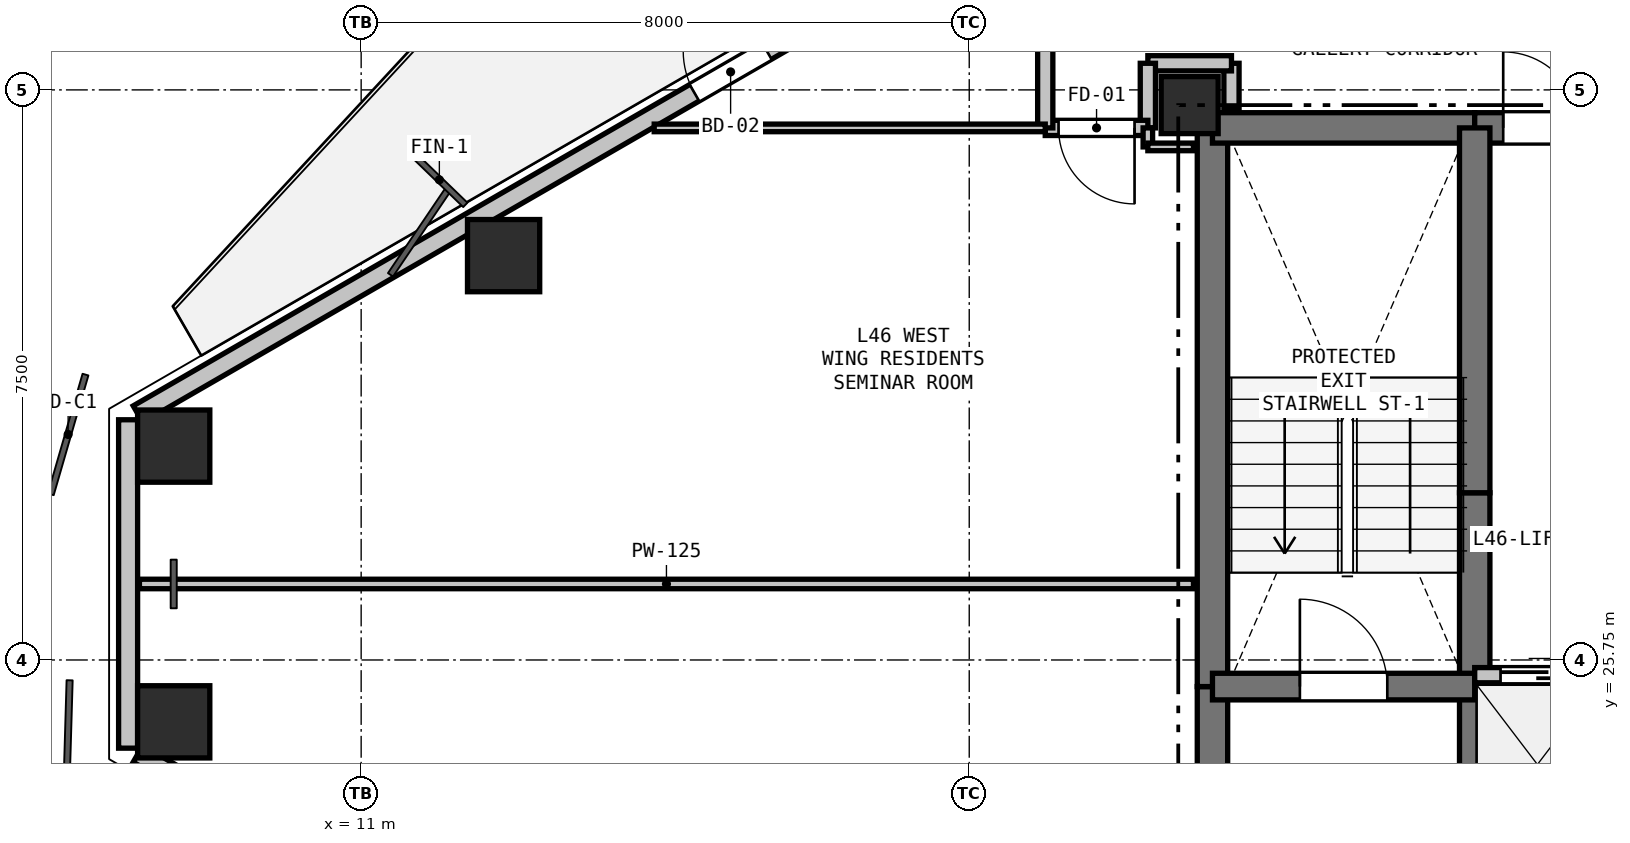
"""IFC4 building model, lengths in metres.
Left out: names, types, materials, properties, quantities, classifications, styles, units other than length and angle.
Written with IfcOpenShell. Run it as: python <this file> out.ifc"""

import sys

from ifc_helpers import new_model, si_unit, direction, frame, frame_2d, origin, origin_2d, place, context, subcontext, project, spatial, rectangle, hollow_rectangle, extrude, element, fill, save


model = new_model("IFC4")
c1 = context("Model", 3, precision=1e-05, world=origin(), true_north=direction((0.0, 1.0)))
c2 = subcontext(c1, "Body", "Model", "MODEL_VIEW")
j1 = project(units=[si_unit("LENGTHUNIT", "METRE"), si_unit("PLANEANGLEUNIT", "RADIAN")], contexts=[c1])
p1 = place(None, origin())
s1 = spatial("IfcSite", under=j1, at=p1, CompositionType="ELEMENT")
p2 = place(p1, origin())
s2 = spatial("IfcBuilding", under=s1, at=p2, CompositionType="ELEMENT")
p3 = place(p2, frame((0.0, 0.0, 167.4)))
s3 = spatial("IfcBuildingStorey", under=s2, at=p3, CompositionType="ELEMENT", Elevation=167.4)
p4 = place(p3, frame((21.9, 33.05, 0.0), z_axis=(0.0, 0.0, 1.0), x_axis=(1.0, 0.0, 0.0)))
e1 = element("IfcColumn", 1, at=p4, inside=s3, PredefinedType="COLUMN", context=c2, shape_type="SweptSolid", body=[
    extrude(rectangle(XDim=0.75, YDim=0.75, at=origin_2d()), origin(), (0.0, 0.0, 1.0), 3.3),
])
for number, where, z_axis, x_axis in (
    (2, (8.534, 28.564, -0.23), (0.0, 0.0, 1.0), (1.0, 0.0, 0.0)),
    (3, (12.874, 31.07, -0.23), (0.0, 0.0, 1.0), (1.0, 0.0, 0.0)),
    (4, (8.534, 24.936, -0.23), (0.0, 0.0, 1.0), (1.0, 0.0, 0.0)),
):
    element("IfcColumn", number, at=place(p3, frame(where, z_axis=z_axis, x_axis=x_axis)), inside=s3, PredefinedType="COLUMN", context=c2, shape_type="SweptSolid", body=[
        extrude(hollow_rectangle(XDim=0.95, YDim=0.95, WallThickness=0.028, at=origin_2d()), origin(), (0.0, 0.0, 1.0), 3.53),
    ])
p5 = place(p3, frame((7.934, 24.59, 0.0), z_axis=(0.0, 0.0, 1.0), x_axis=(0.0, 1.0, 0.0)))
e5 = element("IfcWall", 5, at=p5, inside=s3, PredefinedType="SOLIDWALL", context=c2, shape_type="SweptSolid", body=[
    extrude(rectangle(XDim=4.32, YDim=0.25, at=frame_2d((2.16, 0.0))), origin(), (0.0, 0.0, 1.0), 2.64),
])
p6 = place(p3, frame((8.064, 28.985, 0.0), z_axis=(0.0, 0.0, 1.0), x_axis=(0.866027516296, 0.499996341005, 0.0)))
e6 = element("IfcWall", 6, at=p6, inside=s3, PredefinedType="SOLIDWALL", context=c2, shape_type="SweptSolid", body=[
    extrude(rectangle(XDim=10.442, YDim=0.25, at=frame_2d((5.221, 0.0))), origin(), (0.0, 0.0, 1.0), 2.64),
])
p7 = place(p6, frame((8.453, 0.0, 0.0)))
e7 = element("IfcOpeningElement", 7, at=p7, cuts=e6, PredefinedType="OPENING", context=c2, shape_type="SweptSolid", body=[
    extrude(rectangle(XDim=1.1, YDim=2.1, at=frame_2d((0.55, 1.05))), frame((0.0, 0.135, 0.0), z_axis=(0.0, -1.0, 0.0), x_axis=(1.0, 0.0, 0.0)), (0.0, 0.0, 1.0), 0.27),
])
p8 = place(p3, frame((17.107, 19.294, 0.0), z_axis=(0.0, 0.0, 1.0), x_axis=(-0.866027516296, 0.499996341005, 0.0)))
e8 = element("IfcWall", 8, at=p8, inside=s3, PredefinedType="SOLIDWALL", context=c2, shape_type="SweptSolid", body=[
    extrude(rectangle(XDim=10.442, YDim=0.25, at=frame_2d((5.221, 0.0))), origin(), (0.0, 0.0, 1.0), 2.64),
])
p9 = place(p8, frame((6.871, 0.0, 0.9)))
e9 = element("IfcOpeningElement", 9, at=p9, cuts=e8, PredefinedType="OPENING", context=c2, shape_type="SweptSolid", body=[
    extrude(rectangle(XDim=0.9, YDim=1.4, at=frame_2d((0.45, 0.7))), frame((0.0, 0.135, 0.0), z_axis=(0.0, -1.0, 0.0), x_axis=(1.0, 0.0, 0.0)), (0.0, 0.0, 1.0), 0.27),
])
p10 = place(p3, frame((22.2, 20.75, 0.0), z_axis=(0.0, 0.0, 1.0), x_axis=(0.0, 1.0, 0.0)))
e10 = element("IfcWall", 10, at=p10, inside=s3, PredefinedType="SHEAR", context=c2, shape_type="SweptSolid", body=[
    extrude(rectangle(XDim=4.65, YDim=0.4, at=frame_2d((2.325, 0.0))), origin(), (0.0, 0.0, 1.0), 3.02),
])
p11 = place(p3, frame((22.2, 25.4, 0.0), z_axis=(0.0, 0.0, 1.0), x_axis=(0.0, 1.0, 0.0)))
e11 = element("IfcWall", 11, at=p11, inside=s3, PredefinedType="SHEAR", context=c2, shape_type="SweptSolid", body=[
    extrude(rectangle(XDim=7.35, YDim=0.4, at=frame_2d((3.675, 0.0))), origin(), (0.0, 0.0, 1.0), 3.02),
])
p12 = place(p3, frame((22.2, 32.75, 0.0), z_axis=(0.0, 0.0, 1.0), x_axis=(1.0, 0.0, 0.0)))
e12 = element("IfcWall", 12, at=p12, inside=s3, PredefinedType="SHEAR", context=c2, shape_type="SweptSolid", body=[
    extrude(rectangle(XDim=3.45, YDim=0.4, at=frame_2d((1.725, 0.0))), origin(), (0.0, 0.0, 1.0), 3.02),
])
p13 = place(p3, frame((25.65, 32.75, 0.0), z_axis=(0.0, 0.0, 1.0), x_axis=(1.0, 0.0, 0.0)))
e13 = element("IfcWall", 13, at=p13, inside=s3, PredefinedType="SHEAR", context=c2, shape_type="SweptSolid", body=[
    extrude(rectangle(XDim=1.75, YDim=0.4, at=frame_2d((0.875, 0.0))), origin(), (0.0, 0.0, 1.0), 3.02),
])
p14 = place(p13, frame((0.375, 0.0, 0.0)))
e14 = element("IfcOpeningElement", 14, at=p14, cuts=e13, PredefinedType="OPENING", context=c2, shape_type="SweptSolid", body=[
    extrude(rectangle(XDim=1.0, YDim=2.15, at=frame_2d((0.5, 1.075))), frame((0.0, 0.21, 0.0), z_axis=(0.0, -1.0, 0.0), x_axis=(1.0, 0.0, 0.0)), (0.0, 0.0, 1.0), 0.42),
])
p15 = place(p3, frame((25.65, 22.75, 0.0), z_axis=(0.0, 0.0, 1.0), x_axis=(0.0, 1.0, 0.0)))
e15 = element("IfcWall", 15, at=p15, inside=s3, PredefinedType="SHEAR", context=c2, shape_type="SweptSolid", body=[
    extrude(rectangle(XDim=2.8, YDim=0.4, at=frame_2d((1.4, 0.0))), origin(), (0.0, 0.0, 1.0), 3.02),
])
p16 = place(p3, frame((25.65, 25.55, 0.0), z_axis=(0.0, 0.0, 1.0), x_axis=(0.0, 1.0, 0.0)))
e16 = element("IfcWall", 16, at=p16, inside=s3, PredefinedType="SHEAR", context=c2, shape_type="SweptSolid", body=[
    extrude(rectangle(XDim=2.4, YDim=0.4, at=frame_2d((1.2, 0.0))), origin(), (0.0, 0.0, 1.0), 3.02),
])
p17 = place(p3, frame((25.65, 27.95, 0.0), z_axis=(0.0, 0.0, 1.0), x_axis=(0.0, 1.0, 0.0)))
e17 = element("IfcWall", 17, at=p17, inside=s3, PredefinedType="SHEAR", context=c2, shape_type="SweptSolid", body=[
    extrude(rectangle(XDim=4.8, YDim=0.4, at=frame_2d((2.4, 0.0))), origin(), (0.0, 0.0, 1.0), 3.02),
])
p18 = place(p3, frame((22.2, 25.4, 0.0), z_axis=(0.0, 0.0, 1.0), x_axis=(1.0, 0.0, 0.0)))
e18 = element("IfcWall", 18, at=p18, inside=s3, PredefinedType="SHEAR", context=c2, shape_type="SweptSolid", body=[
    extrude(rectangle(XDim=3.45, YDim=0.35, at=frame_2d((1.725, 0.0))), origin(), (0.0, 0.0, 1.0), 3.02),
])
p19 = place(p18, frame((1.15, 0.0, 0.0)))
e19 = element("IfcOpeningElement", 19, at=p19, cuts=e18, PredefinedType="OPENING", context=c2, shape_type="SweptSolid", body=[
    extrude(rectangle(XDim=1.15, YDim=2.15, at=frame_2d((0.575, 1.075))), frame((0.0, 0.185, 0.0), z_axis=(0.0, -1.0, 0.0), x_axis=(1.0, 0.0, 0.0)), (0.0, 0.0, 1.0), 0.37),
])
p20 = place(p3, frame((25.65, 25.55, 0.0), z_axis=(0.0, 0.0, 1.0), x_axis=(1.0, 0.0, 0.0)))
e20 = element("IfcWall", 20, at=p20, inside=s3, PredefinedType="PARTITIONING", context=c2, shape_type="SweptSolid", body=[
    extrude(rectangle(XDim=4.95, YDim=0.2, at=frame_2d((2.475, 0.0))), origin(), (0.0, 0.0, 1.0), 3.02),
])
p21 = place(p20, frame((0.34, 0.0, 0.0)))
e21 = element("IfcOpeningElement", 21, at=p21, cuts=e20, PredefinedType="OPENING", context=c2, shape_type="SweptSolid", body=[
    extrude(rectangle(XDim=1.1, YDim=2.15, at=frame_2d((0.55, 1.075))), frame((0.0, 0.11, 0.0), z_axis=(0.0, -1.0, 0.0), x_axis=(1.0, 0.0, 0.0)), (0.0, 0.0, 1.0), 0.22),
])
p22 = place(p20, frame((1.99, 0.0, 0.0)))
e22 = element("IfcOpeningElement", 22, at=p22, cuts=e20, PredefinedType="OPENING", context=c2, shape_type="SweptSolid", body=[
    extrude(rectangle(XDim=1.1, YDim=2.15, at=frame_2d((0.55, 1.075))), frame((0.0, 0.11, 0.0), z_axis=(0.0, -1.0, 0.0), x_axis=(1.0, 0.0, 0.0)), (0.0, 0.0, 1.0), 0.22),
])
p23 = place(p20, frame((3.64, 0.0, 0.0)))
e23 = element("IfcOpeningElement", 23, at=p23, cuts=e20, PredefinedType="OPENING", context=c2, shape_type="SweptSolid", body=[
    extrude(rectangle(XDim=1.1, YDim=2.15, at=frame_2d((0.55, 1.075))), frame((0.0, 0.11, 0.0), z_axis=(0.0, -1.0, 0.0), x_axis=(1.0, 0.0, 0.0)), (0.0, 0.0, 1.0), 0.22),
])
p24 = place(p3, frame((22.45, 33.0, 0.0), z_axis=(0.0, 0.0, 1.0), x_axis=(0.0, 1.0, 0.0)))
e24 = element("IfcWall", 24, at=p24, inside=s3, PredefinedType="PARTITIONING", context=c2, shape_type="SweptSolid", body=[
    extrude(rectangle(XDim=0.6, YDim=0.2, at=frame_2d((0.3, 0.0))), origin(), (0.0, 0.0, 1.0), 2.545),
])
p25 = place(p3, frame((22.45, 33.6, 0.0), z_axis=(0.0, 0.0, 1.0), x_axis=(-1.0, 0.0, 0.0)))
e25 = element("IfcWall", 25, at=p25, inside=s3, PredefinedType="PARTITIONING", context=c2, shape_type="SweptSolid", body=[
    extrude(rectangle(XDim=1.1, YDim=0.2, at=frame_2d((0.55, 0.0))), origin(), (0.0, 0.0, 1.0), 3.02),
])
p26 = place(p3, frame((21.35, 33.6, 0.0), z_axis=(0.0, 0.0, 1.0), x_axis=(0.0, -1.0, 0.0)))
e26 = element("IfcWall", 26, at=p26, inside=s3, PredefinedType="PARTITIONING", context=c2, shape_type="SweptSolid", body=[
    extrude(rectangle(XDim=0.85, YDim=0.2, at=frame_2d((0.425, 0.0))), origin(), (0.0, 0.0, 1.0), 2.469),
])
p27 = place(p3, frame((21.35, 32.75, 0.0), z_axis=(0.0, 0.0, 1.0), x_axis=(-1.0, 0.0, 0.0)))
e27 = element("IfcWall", 27, at=p27, inside=s3, PredefinedType="PARTITIONING", context=c2, shape_type="SweptSolid", body=[
    extrude(rectangle(XDim=1.35, YDim=0.2, at=frame_2d((0.675, 0.0))), origin(), (0.0, 0.0, 1.0), 2.469),
])
p28 = place(p27, frame((0.175, 0.0, 0.0)))
e28 = element("IfcOpeningElement", 28, at=p28, cuts=e27, PredefinedType="OPENING", context=c2, shape_type="SweptSolid", body=[
    extrude(rectangle(XDim=1.0, YDim=2.15, at=frame_2d((0.5, 1.075))), frame((0.0, 0.11, 0.0), z_axis=(0.0, -1.0, 0.0), x_axis=(1.0, 0.0, 0.0)), (0.0, 0.0, 1.0), 0.22),
])
p29 = place(p3, frame((20.0, 32.75, 0.0), z_axis=(0.0, 0.0, 1.0), x_axis=(0.0, 1.0, 0.0)))
e29 = element("IfcWall", 29, at=p29, inside=s3, PredefinedType="PARTITIONING", context=c2, shape_type="SweptSolid", body=[
    extrude(rectangle(XDim=3.083, YDim=0.2, at=frame_2d((1.541, 0.0))), origin(), (0.0, 0.0, 1.0), 2.365),
])
p30 = place(p3, frame((14.855, 32.75, 0.0), z_axis=(0.0, 0.0, 1.0), x_axis=(1.0, 0.0, 0.0)))
e30 = element("IfcWall", 30, at=p30, inside=s3, PredefinedType="PARTITIONING", context=c2, shape_type="SweptSolid", body=[
    extrude(rectangle(XDim=5.145, YDim=0.1, at=frame_2d((2.572, 0.0))), origin(), (0.0, 0.0, 1.0), 2.365),
])
p31 = place(p3, frame((21.35, 32.75, 0.0), z_axis=(0.0, 0.0, 1.0), x_axis=(0.0, -1.0, 0.0)))
e31 = element("IfcWall", 31, at=p31, inside=s3, PredefinedType="PARTITIONING", context=c2, shape_type="SweptSolid", body=[
    extrude(rectangle(XDim=0.25, YDim=0.125, at=frame_2d((0.125, 0.0))), origin(), (0.0, 0.0, 1.0), 3.02),
])
p32 = place(p3, frame((21.35, 32.5, 0.0), z_axis=(0.0, 0.0, 1.0), x_axis=(1.0, 0.0, 0.0)))
e32 = element("IfcWall", 32, at=p32, inside=s3, PredefinedType="PARTITIONING", context=c2, shape_type="SweptSolid", body=[
    extrude(rectangle(XDim=0.6, YDim=0.1, at=frame_2d((0.3, 0.0))), origin(), (0.0, 0.0, 1.0), 2.545),
])
p33 = place(p3, frame((21.95, 26.75, 0.0), z_axis=(0.0, 0.0, 1.0), x_axis=(-1.0, 0.0, 0.0)))
e33 = element("IfcWall", 33, at=p33, inside=s3, PredefinedType="PARTITIONING", context=c2, shape_type="SweptSolid", body=[
    extrude(rectangle(XDim=13.867, YDim=0.125, at=frame_2d((6.934, 0.0))), origin(), (0.0, 0.0, 1.0), 2.545),
])
p34 = place(p7, origin())
e34 = element("IfcDoor", 34, at=p34, inside=s3, OperationType="SINGLE_SWING_RIGHT", PredefinedType="DOOR", context=c2, shape_type="SweptSolid", body=[
    extrude(rectangle(XDim=1.1, YDim=2.1, at=frame_2d((0.55, 1.05))), frame((0.0, 0.025, 0.0), z_axis=(0.0, -1.0, 0.0), x_axis=(1.0, 0.0, 0.0)), (0.0, 0.0, 1.0), 0.05),
])
fill(e7, e34)
p35 = place(p21, origin())
e35 = element("IfcDoor", 35, at=p35, inside=s3, OperationType="SLIDING_TO_LEFT", PredefinedType="DOOR", context=c2, shape_type="SweptSolid", body=[
    extrude(rectangle(XDim=1.1, YDim=2.15, at=frame_2d((0.55, 1.075))), frame((0.0, 0.025, 0.0), z_axis=(0.0, -1.0, 0.0), x_axis=(1.0, 0.0, 0.0)), (0.0, 0.0, 1.0), 0.05),
])
fill(e21, e35)
p36 = place(p14, origin())
e36 = element("IfcDoor", 36, at=p36, inside=s3, OperationType="SINGLE_SWING_LEFT", PredefinedType="DOOR", context=c2, shape_type="SweptSolid", body=[
    extrude(rectangle(XDim=1.0, YDim=2.15, at=frame_2d((0.5, 1.075))), frame((0.0, 0.025, 0.0), z_axis=(0.0, -1.0, 0.0), x_axis=(1.0, 0.0, 0.0)), (0.0, 0.0, 1.0), 0.05),
])
fill(e14, e36)
p37 = place(p19, origin())
e37 = element("IfcDoor", 37, at=p37, inside=s3, OperationType="SINGLE_SWING_LEFT", PredefinedType="DOOR", context=c2, shape_type="SweptSolid", body=[
    extrude(rectangle(XDim=1.15, YDim=2.15, at=frame_2d((0.575, 1.075))), frame((0.0, 0.025, 0.0), z_axis=(0.0, -1.0, 0.0), x_axis=(1.0, 0.0, 0.0)), (0.0, 0.0, 1.0), 0.05),
])
fill(e19, e37)
p38 = place(p28, origin())
e38 = element("IfcDoor", 38, at=p38, inside=s3, OperationType="SINGLE_SWING_LEFT", PredefinedType="DOOR", context=c2, shape_type="SweptSolid", body=[
    extrude(rectangle(XDim=1.0, YDim=2.15, at=frame_2d((0.5, 1.075))), frame((0.0, 0.025, 0.0), z_axis=(0.0, -1.0, 0.0), x_axis=(1.0, 0.0, 0.0)), (0.0, 0.0, 1.0), 0.05),
])
fill(e28, e38)
save(model, sys.argv[1])
